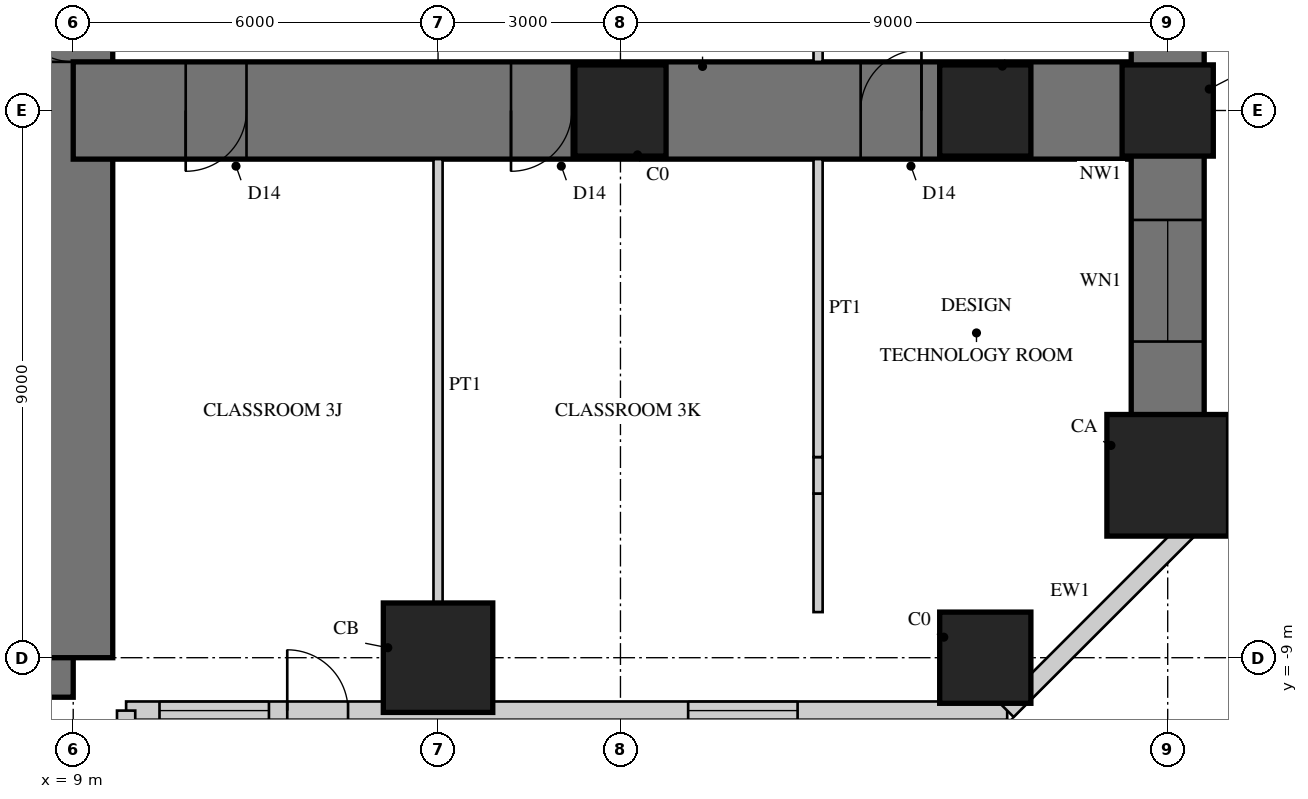
"""IFC4 building model, lengths in metres.
Left out: names, types, materials, properties, quantities, classifications, styles, units other than length and angle.
Written with IfcOpenShell. Run it as: python <this file> out.ifc"""

import sys

from ifc_helpers import new_model, si_unit, direction, frame, frame_2d, origin, origin_2d, place, context, subcontext, project, spatial, rectangle, hollow_rectangle, extrude, element, fill, save


model = new_model("IFC4")
c1 = context("Model", 3, precision=1e-05, world=origin(), true_north=direction((0.0, 1.0)))
c2 = subcontext(c1, "Body", "Model", "MODEL_VIEW")
j1 = project(units=[si_unit("LENGTHUNIT", "METRE"), si_unit("PLANEANGLEUNIT", "RADIAN")], contexts=[c1])
p1 = place(None, origin())
s1 = spatial("IfcSite", under=j1, at=p1, CompositionType="ELEMENT")
p2 = place(p1, origin())
s2 = spatial("IfcBuilding", under=s1, at=p2, CompositionType="ELEMENT")
p3 = place(p2, frame((0.0, 0.0, 14.0)))
s3 = spatial("IfcBuildingStorey", under=s2, at=p3, CompositionType="ELEMENT", Elevation=14.0)
p4 = place(p3, frame((-9.0, -9.0, 0.0), z_axis=(0.0, 0.0, 1.0), x_axis=(1.0, 0.0, 0.0)))
e1 = element("IfcWall", 1, at=p4, inside=s3, PredefinedType="SHEAR", context=c2, shape_type="SweptSolid", body=[
    extrude(rectangle(XDim=18.0, YDim=1.3, at=frame_2d((9.0, 0.0))), origin(), (0.0, 0.0, 1.0), 4.5),
])
p5 = place(p4, frame((9.8, 0.0, 0.0)))
e2 = element("IfcOpeningElement", 2, at=p5, cuts=e1, PredefinedType="OPENING", context=c2, shape_type="SweptSolid", body=[
    extrude(rectangle(XDim=1.0, YDim=2.4, at=frame_2d((0.5, 1.2))), frame((0.0, 0.66, 0.0), z_axis=(0.0, -1.0, 0.0), x_axis=(1.0, 0.0, 0.0)), (0.0, 0.0, 1.0), 1.32),
])
p6 = place(p3, frame((9.0, -9.0, 0.0), z_axis=(0.0, 0.0, 1.0), x_axis=(0.0, 1.0, 0.0)))
e3 = element("IfcWall", 3, at=p6, inside=s3, PredefinedType="SHEAR", context=c2, shape_type="SweptSolid", body=[
    extrude(rectangle(XDim=18.0, YDim=1.3, at=frame_2d((9.0, 0.0))), origin(), (0.0, 0.0, 1.0), 4.5),
])
p7 = place(p6, frame((9.8, 0.0, 0.0)))
e4 = element("IfcOpeningElement", 4, at=p7, cuts=e3, PredefinedType="OPENING", context=c2, shape_type="SweptSolid", body=[
    extrude(rectangle(XDim=1.0, YDim=2.4, at=frame_2d((0.5, 1.2))), frame((0.0, 0.66, 0.0), z_axis=(0.0, -1.0, 0.0), x_axis=(1.0, 0.0, 0.0)), (0.0, 0.0, 1.0), 1.32),
])
p8 = place(p3, frame((9.0, 0.0, 0.0), z_axis=(0.0, 0.0, 1.0), x_axis=(1.0, 0.0, 0.0)))
e5 = element("IfcWall", 5, at=p8, inside=s3, PredefinedType="SHEAR", context=c2, shape_type="SweptSolid", body=[
    extrude(rectangle(XDim=18.0, YDim=1.6, at=frame_2d((9.0, 0.0))), origin(), (0.0, 0.0, 1.0), 4.5),
])
p9 = place(p8, frame((1.85, 0.0, 0.0)))
e6 = element("IfcOpeningElement", 6, at=p9, cuts=e5, PredefinedType="OPENING", context=c2, shape_type="SweptSolid", body=[
    extrude(rectangle(XDim=1.0, YDim=2.2, at=frame_2d((0.5, 1.1))), frame((0.0, 0.81, 0.0), z_axis=(0.0, -1.0, 0.0), x_axis=(1.0, 0.0, 0.0)), (0.0, 0.0, 1.0), 1.62),
])
p10 = place(p8, frame((7.2, 0.0, 0.0)))
e7 = element("IfcOpeningElement", 7, at=p10, cuts=e5, PredefinedType="OPENING", context=c2, shape_type="SweptSolid", body=[
    extrude(rectangle(XDim=1.0, YDim=2.2, at=frame_2d((0.5, 1.1))), frame((0.0, 0.81, 0.0), z_axis=(0.0, -1.0, 0.0), x_axis=(1.0, 0.0, 0.0)), (0.0, 0.0, 1.0), 1.62),
])
p11 = place(p8, frame((12.95, 0.0, 0.0)))
e8 = element("IfcOpeningElement", 8, at=p11, cuts=e5, PredefinedType="OPENING", context=c2, shape_type="SweptSolid", body=[
    extrude(rectangle(XDim=1.0, YDim=2.2, at=frame_2d((0.5, 1.1))), frame((0.0, 0.81, 0.0), z_axis=(0.0, -1.0, 0.0), x_axis=(1.0, 0.0, 0.0)), (0.0, 0.0, 1.0), 1.62),
])
p12 = place(p3, frame((27.0, -6.0, 0.0), z_axis=(0.0, 0.0, 1.0), x_axis=(0.0, 1.0, 0.0)))
e9 = element("IfcWall", 9, at=p12, inside=s3, PredefinedType="SHEAR", context=c2, shape_type="SweptSolid", body=[
    extrude(rectangle(XDim=12.0, YDim=1.2, at=frame_2d((6.0, 0.0))), origin(), (0.0, 0.0, 1.0), 4.5),
])
p13 = place(p12, frame((2.2, 0.0, 0.9)))
e10 = element("IfcOpeningElement", 10, at=p13, cuts=e9, PredefinedType="OPENING", context=c2, shape_type="SweptSolid", body=[
    extrude(rectangle(XDim=2.0, YDim=1.8, at=frame_2d((1.0, 0.9))), frame((0.0, 0.61, 0.0), z_axis=(0.0, -1.0, 0.0), x_axis=(1.0, 0.0, 0.0)), (0.0, 0.0, 1.0), 1.22),
])
p14 = place(p12, frame((7.8, 0.0, 0.9)))
e11 = element("IfcOpeningElement", 11, at=p14, cuts=e9, PredefinedType="OPENING", context=c2, shape_type="SweptSolid", body=[
    extrude(rectangle(XDim=2.0, YDim=1.8, at=frame_2d((1.0, 0.9))), frame((0.0, 0.61, 0.0), z_axis=(0.0, -1.0, 0.0), x_axis=(1.0, 0.0, 0.0)), (0.0, 0.0, 1.0), 1.22),
])
p15 = place(p3, frame((15.0, -9.0, 0.0), z_axis=(0.0, 0.0, 1.0), x_axis=(1.0, 0.0, 0.0)))
e12 = element("IfcColumn", 12, at=p15, inside=s3, PredefinedType="COLUMN", context=c2, shape_type="SweptSolid", body=[
    extrude(rectangle(XDim=1.8, YDim=1.8, at=origin_2d()), origin(), (0.0, 0.0, 1.0), 4.5),
])
p16 = place(p3, frame((24.0, -9.0, 0.0), z_axis=(0.0, 0.0, 1.0), x_axis=(1.0, 0.0, 0.0)))
e13 = element("IfcColumn", 13, at=p16, inside=s3, PredefinedType="COLUMN", context=c2, shape_type="SweptSolid", body=[
    extrude(rectangle(XDim=1.5, YDim=1.5, at=origin_2d()), origin(), (0.0, 0.0, 1.0), 4.5),
])
p17 = place(p3, frame((27.0, -6.0, 0.0), z_axis=(0.0, 0.0, 1.0), x_axis=(1.0, 0.0, 0.0)))
e14 = element("IfcColumn", 14, at=p17, inside=s3, PredefinedType="COLUMN", context=c2, shape_type="SweptSolid", body=[
    extrude(rectangle(XDim=2.0, YDim=2.0, at=origin_2d()), origin(), (0.0, 0.0, 1.0), 4.5),
])
for number, where, z_axis, x_axis in (
    (15, (27.0, 0.0, 0.0), (0.0, 0.0, 1.0), (1.0, 0.0, 0.0)),
    (16, (18.0, 0.0, 0.0), (0.0, 0.0, 1.0), (1.0, 0.0, 0.0)),
    (17, (24.0, 0.0, 0.0), (0.0, 0.0, 1.0), (1.0, 0.0, 0.0)),
):
    element("IfcColumn", number, at=place(p3, frame(where, z_axis=z_axis, x_axis=x_axis)), inside=s3, PredefinedType="COLUMN", context=c2, shape_type="SweptSolid", body=[
        extrude(rectangle(XDim=1.5, YDim=1.5, at=origin_2d()), origin(), (0.0, 0.0, 1.0), 4.5),
    ])
p18 = place(p3, frame((9.87, -9.87, 0.0), z_axis=(0.0, 0.0, 1.0), x_axis=(1.0, 0.0, 0.0)))
e18 = element("IfcWall", 18, at=p18, inside=s3, PredefinedType="SOLIDWALL", context=c2, shape_type="SweptSolid", body=[
    extrude(rectangle(XDim=14.49, YDim=0.3, at=frame_2d((7.245, 0.0))), origin(), (0.0, 0.0, 1.0), 4.25),
])
p19 = place(p18, frame((2.65, 0.0, 0.0)))
e19 = element("IfcOpeningElement", 19, at=p19, cuts=e18, PredefinedType="OPENING", context=c2, shape_type="SweptSolid", body=[
    extrude(rectangle(XDim=1.0, YDim=2.4, at=frame_2d((0.5, 1.2))), frame((0.0, 0.16, 0.0), z_axis=(0.0, -1.0, 0.0), x_axis=(1.0, 0.0, 0.0)), (0.0, 0.0, 1.0), 0.32),
])
p20 = place(p18, frame((0.549, 0.0, 0.6)))
e20 = element("IfcOpeningElement", 20, at=p20, cuts=e18, PredefinedType="OPENING", context=c2, shape_type="SweptSolid", body=[
    extrude(rectangle(XDim=1.8, YDim=2.1, at=frame_2d((0.9, 1.05))), frame((0.0, 0.16, 0.0), z_axis=(0.0, -1.0, 0.0), x_axis=(1.0, 0.0, 0.0)), (0.0, 0.0, 1.0), 0.32),
])
p21 = place(p18, frame((9.243, 0.0, 0.6)))
e21 = element("IfcOpeningElement", 21, at=p21, cuts=e18, PredefinedType="OPENING", context=c2, shape_type="SweptSolid", body=[
    extrude(rectangle(XDim=1.8, YDim=2.1, at=frame_2d((0.9, 1.05))), frame((0.0, 0.16, 0.0), z_axis=(0.0, -1.0, 0.0), x_axis=(1.0, 0.0, 0.0)), (0.0, 0.0, 1.0), 0.32),
])
p22 = place(p3, frame((24.36, -9.87, 0.0), z_axis=(0.0, 0.0, 1.0), x_axis=(0.707106781187, 0.707106781187, 0.0)))
e22 = element("IfcWall", 22, at=p22, inside=s3, PredefinedType="SOLIDWALL", context=c2, shape_type="SweptSolid", body=[
    extrude(rectangle(XDim=4.582, YDim=0.3, at=frame_2d((2.291, 0.0))), origin(), (0.0, 0.0, 1.0), 4.25),
])
p23 = place(p3, frame((9.87, -24.36, 0.0), z_axis=(0.0, 0.0, 1.0), x_axis=(0.0, 1.0, 0.0)))
e23 = element("IfcWall", 23, at=p23, inside=s3, PredefinedType="SOLIDWALL", context=c2, shape_type="SweptSolid", body=[
    extrude(rectangle(XDim=14.49, YDim=0.3, at=frame_2d((7.245, 0.0))), origin(), (0.0, 0.0, 1.0), 4.25),
])
p24 = place(p23, frame((6.9, 0.0, 0.0)))
e24 = element("IfcOpeningElement", 24, at=p24, cuts=e23, PredefinedType="OPENING", context=c2, shape_type="SweptSolid", body=[
    extrude(rectangle(XDim=1.0, YDim=2.4, at=frame_2d((0.5, 1.2))), frame((0.0, 0.16, 0.0), z_axis=(0.0, -1.0, 0.0), x_axis=(1.0, 0.0, 0.0)), (0.0, 0.0, 1.0), 0.32),
])
p25 = place(p23, frame((3.447, 0.0, 0.6)))
e25 = element("IfcOpeningElement", 25, at=p25, cuts=e23, PredefinedType="OPENING", context=c2, shape_type="SweptSolid", body=[
    extrude(rectangle(XDim=1.8, YDim=2.1, at=frame_2d((0.9, 1.05))), frame((0.0, 0.16, 0.0), z_axis=(0.0, -1.0, 0.0), x_axis=(1.0, 0.0, 0.0)), (0.0, 0.0, 1.0), 0.32),
])
p26 = place(p23, frame((12.141, 0.0, 0.6)))
e26 = element("IfcOpeningElement", 26, at=p26, cuts=e23, PredefinedType="OPENING", context=c2, shape_type="SweptSolid", body=[
    extrude(rectangle(XDim=1.8, YDim=2.1, at=frame_2d((0.9, 1.05))), frame((0.0, 0.16, 0.0), z_axis=(0.0, -1.0, 0.0), x_axis=(1.0, 0.0, 0.0)), (0.0, 0.0, 1.0), 0.32),
])
p27 = place(p3, frame((15.0, -8.25, 0.0), z_axis=(0.0, 0.0, 1.0), x_axis=(0.0, 1.0, 0.0)))
e27 = element("IfcWall", 27, at=p27, inside=s3, PredefinedType="PARTITIONING", context=c2, shape_type="SweptSolid", body=[
    extrude(rectangle(XDim=7.45, YDim=0.15, at=frame_2d((3.725, 0.0))), origin(), (0.0, 0.0, 1.0), 3.2),
])
p28 = place(p3, frame((21.25, -8.25, 0.0), z_axis=(0.0, 0.0, 1.0), x_axis=(0.0, 1.0, 0.0)))
e28 = element("IfcWall", 28, at=p28, inside=s3, PredefinedType="PARTITIONING", context=c2, shape_type="SweptSolid", body=[
    extrude(rectangle(XDim=1.95, YDim=0.15, at=frame_2d((0.975, 0.0))), origin(), (0.0, 0.0, 1.0), 3.3),
])
p29 = place(p3, frame((21.25, -6.3, 0.0), z_axis=(0.0, 0.0, 1.0), x_axis=(0.0, 1.0, 0.0)))
e29 = element("IfcWall", 29, at=p29, inside=s3, PredefinedType="PARTITIONING", context=c2, shape_type="SweptSolid", body=[
    extrude(rectangle(XDim=0.6, YDim=0.15, at=frame_2d((0.3, 0.0))), origin(), (0.0, 0.0, 1.0), 4.25),
])
p30 = place(p3, frame((21.25, -5.7, 0.0), z_axis=(0.0, 0.0, 1.0), x_axis=(0.0, 1.0, 0.0)))
e30 = element("IfcWall", 30, at=p30, inside=s3, PredefinedType="PARTITIONING", context=c2, shape_type="SweptSolid", body=[
    extrude(rectangle(XDim=4.9, YDim=0.15, at=frame_2d((2.45, 0.0))), origin(), (0.0, 0.0, 1.0), 3.3),
])
p31 = place(p3, frame((21.25, 0.8, 0.0), z_axis=(0.0, 0.0, 1.0), x_axis=(0.0, 1.0, 0.0)))
e31 = element("IfcWall", 31, at=p31, inside=s3, PredefinedType="PARTITIONING", context=c2, shape_type="SweptSolid", body=[
    extrude(rectangle(XDim=4.9, YDim=0.15, at=frame_2d((2.45, 0.0))), origin(), (0.0, 0.0, 1.0), 3.3),
])
p32 = place(p31, frame((0.35, 0.0, 0.0)))
e32 = element("IfcOpeningElement", 32, at=p32, cuts=e31, PredefinedType="OPENING", context=c2, shape_type="SweptSolid", body=[
    extrude(rectangle(XDim=1.0, YDim=2.2, at=frame_2d((0.5, 1.1))), frame((0.0, 0.085, 0.0), z_axis=(0.0, -1.0, 0.0), x_axis=(1.0, 0.0, 0.0)), (0.0, 0.0, 1.0), 0.17),
])
p33 = place(p19, origin())
e33 = element("IfcDoor", 33, at=p33, inside=s3, OperationType="SINGLE_SWING_LEFT", PredefinedType="DOOR", context=c2, shape_type="SweptSolid", body=[
    extrude(hollow_rectangle(XDim=1.0, YDim=2.4, WallThickness=0.06, at=frame_2d((0.5, 1.2))), frame((0.0, 0.025, 0.0), z_axis=(0.0, -1.0, 0.0), x_axis=(1.0, 0.0, 0.0)), (0.0, 0.0, 1.0), 0.05),
    extrude(rectangle(XDim=0.879, YDim=2.279, at=frame_2d((0.5, 1.2))), frame((0.0, 0.025, 0.0), z_axis=(0.0, -1.0, 0.0), x_axis=(1.0, 0.0, 0.0)), (0.0, 0.0, 1.0), 0.05),
])
fill(e19, e33)
p34 = place(p20, origin())
e34 = element("IfcWindow", 34, at=p34, inside=s3, PartitioningType="SINGLE_PANEL", PredefinedType="WINDOW", context=c2, shape_type="SweptSolid", body=[
    extrude(hollow_rectangle(XDim=1.8, YDim=2.1, WallThickness=0.06, at=frame_2d((0.9, 1.05))), frame((0.0, 0.03, 0.0), z_axis=(0.0, -1.0, 0.0), x_axis=(1.0, 0.0, 0.0)), (0.0, 0.0, 1.0), 0.06),
    extrude(rectangle(XDim=1.679, YDim=1.979, at=frame_2d((0.9, 1.05))), frame((0.0, 0.03, 0.0), z_axis=(0.0, -1.0, 0.0), x_axis=(1.0, 0.0, 0.0)), (0.0, 0.0, 1.0), 0.06),
])
fill(e20, e34)
p35 = place(p21, origin())
e35 = element("IfcWindow", 35, at=p35, inside=s3, PartitioningType="SINGLE_PANEL", PredefinedType="WINDOW", context=c2, shape_type="SweptSolid", body=[
    extrude(hollow_rectangle(XDim=1.8, YDim=2.1, WallThickness=0.06, at=frame_2d((0.9, 1.05))), frame((0.0, 0.03, 0.0), z_axis=(0.0, -1.0, 0.0), x_axis=(1.0, 0.0, 0.0)), (0.0, 0.0, 1.0), 0.06),
    extrude(rectangle(XDim=1.679, YDim=1.979, at=frame_2d((0.9, 1.05))), frame((0.0, 0.03, 0.0), z_axis=(0.0, -1.0, 0.0), x_axis=(1.0, 0.0, 0.0)), (0.0, 0.0, 1.0), 0.06),
])
fill(e21, e35)
p36 = place(p13, origin())
e36 = element("IfcWindow", 36, at=p36, inside=s3, PartitioningType="SINGLE_PANEL", PredefinedType="WINDOW", context=c2, shape_type="SweptSolid", body=[
    extrude(hollow_rectangle(XDim=2.0, YDim=1.8, WallThickness=0.06, at=frame_2d((1.0, 0.9))), frame((0.0, 0.03, 0.0), z_axis=(0.0, -1.0, 0.0), x_axis=(1.0, 0.0, 0.0)), (0.0, 0.0, 1.0), 0.06),
    extrude(rectangle(XDim=1.879, YDim=1.679, at=frame_2d((1.0, 0.9))), frame((0.0, 0.03, 0.0), z_axis=(0.0, -1.0, 0.0), x_axis=(1.0, 0.0, 0.0)), (0.0, 0.0, 1.0), 0.06),
])
fill(e10, e36)
p37 = place(p9, frame((1.0, 0.0, 0.0), z_axis=(0.0, 0.0, 1.0), x_axis=(-1.0, 0.0, 0.0)))
e37 = element("IfcDoor", 37, at=p37, inside=s3, OperationType="SINGLE_SWING_RIGHT", PredefinedType="DOOR", context=c2, shape_type="SweptSolid", body=[
    extrude(rectangle(XDim=1.0, YDim=2.2, at=frame_2d((0.5, 1.1))), frame((0.0, 0.025, 0.0), z_axis=(0.0, -1.0, 0.0), x_axis=(1.0, 0.0, 0.0)), (0.0, 0.0, 1.0), 0.05),
])
fill(e6, e37)
p38 = place(p10, frame((1.0, 0.0, 0.0), z_axis=(0.0, 0.0, 1.0), x_axis=(-1.0, 0.0, 0.0)))
e38 = element("IfcDoor", 38, at=p38, inside=s3, OperationType="SINGLE_SWING_RIGHT", PredefinedType="DOOR", context=c2, shape_type="SweptSolid", body=[
    extrude(rectangle(XDim=1.0, YDim=2.2, at=frame_2d((0.5, 1.1))), frame((0.0, 0.025, 0.0), z_axis=(0.0, -1.0, 0.0), x_axis=(1.0, 0.0, 0.0)), (0.0, 0.0, 1.0), 0.05),
])
fill(e7, e38)
p39 = place(p11, origin())
e39 = element("IfcDoor", 39, at=p39, inside=s3, OperationType="SINGLE_SWING_RIGHT", PredefinedType="DOOR", context=c2, shape_type="SweptSolid", body=[
    extrude(rectangle(XDim=1.0, YDim=2.2, at=frame_2d((0.5, 1.1))), frame((0.0, 0.025, 0.0), z_axis=(0.0, -1.0, 0.0), x_axis=(1.0, 0.0, 0.0)), (0.0, 0.0, 1.0), 0.05),
])
fill(e8, e39)
p40 = place(p7, origin())
e40 = element("IfcDoor", 40, at=p40, inside=s3, OperationType="SINGLE_SWING_RIGHT", PredefinedType="DOOR", context=c2, shape_type="SweptSolid", body=[
    extrude(rectangle(XDim=1.0, YDim=2.4, at=frame_2d((0.5, 1.2))), frame((0.0, 0.055, 0.0), z_axis=(0.0, -1.0, 0.0), x_axis=(1.0, 0.0, 0.0)), (0.0, 0.0, 1.0), 0.05),
])
fill(e4, e40)
save(model, sys.argv[1])
